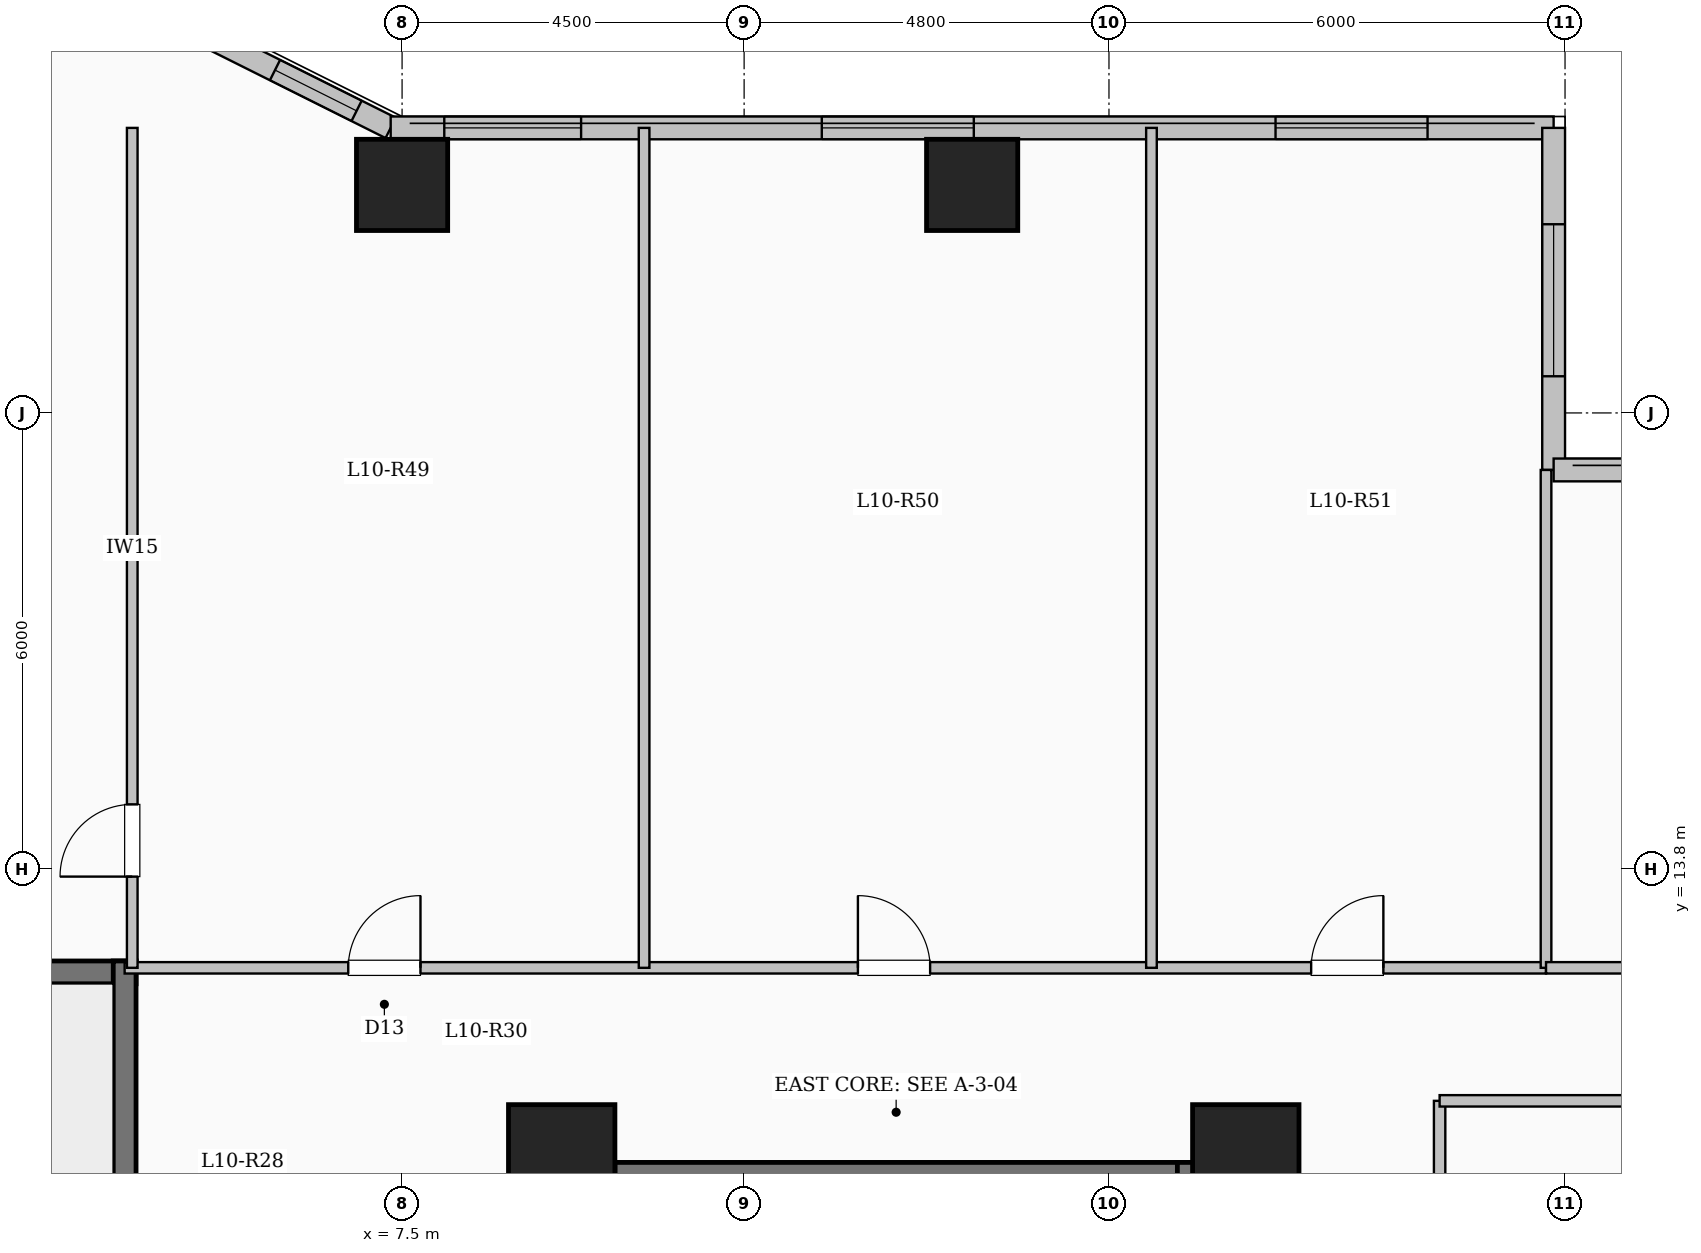
"""IFC4 building model, lengths in metres.
Left out: names, types, materials, properties, quantities, classifications, styles, units other than length and angle.
Written with IfcOpenShell. Run it as: python <this file> out.ifc"""

import sys

from ifc_helpers import new_model, si_unit, direction, frame, frame_2d, origin, origin_2d, place, context, subcontext, project, spatial, rectangle, extrude, element, fill, save


model = new_model("IFC4")
c1 = context("Model", 3, precision=1e-05, world=origin(), true_north=direction((0.0, 1.0)))
c2 = subcontext(c1, "Body", "Model", "MODEL_VIEW")
j1 = project(units=[si_unit("LENGTHUNIT", "METRE"), si_unit("PLANEANGLEUNIT", "RADIAN")], contexts=[c1])
p1 = place(None, origin())
s1 = spatial("IfcSite", under=j1, at=p1, CompositionType="ELEMENT")
p2 = place(p1, origin())
s2 = spatial("IfcBuilding", under=s1, at=p2, CompositionType="ELEMENT")
p3 = place(p2, frame((0.0, 0.0, 40.75)))
s3 = spatial("IfcBuildingStorey", under=s2, at=p3, CompositionType="ELEMENT", Elevation=40.75)
for number, where, z_axis, x_axis in (
    (1, (9.6, 10.0, 0.0), (0.0, 0.0, 1.0), (1.0, 0.0, 0.0)),
    (2, (18.6, 10.0, 0.0), (0.0, 0.0, 1.0), (1.0, 0.0, 0.0)),
):
    element("IfcColumn", number, at=place(p3, frame(where, z_axis=z_axis, x_axis=x_axis)), inside=s3, PredefinedType="COLUMN", context=c2, shape_type="SweptSolid", body=[
        extrude(rectangle(XDim=1.4, YDim=1.4, at=origin_2d()), origin(), (0.0, 0.0, 1.0), 3.35),
    ])
for number, where, z_axis, x_axis in (
    (3, (7.5, 22.8, 0.0), (0.0, 0.0, 1.0), (1.0, 0.0, 0.0)),
    (4, (15.0, 22.8, 0.0), (0.0, 0.0, 1.0), (1.0, 0.0, 0.0)),
):
    element("IfcColumn", number, at=place(p3, frame(where, z_axis=z_axis, x_axis=x_axis)), inside=s3, PredefinedType="COLUMN", context=c2, shape_type="SweptSolid", body=[
        extrude(rectangle(XDim=1.2, YDim=1.2, at=origin_2d()), origin(), (0.0, 0.0, 1.0), 3.35),
    ])
p4 = place(p3, frame((4.35, 25.05, 0.0), z_axis=(0.0, 0.0, 1.0), x_axis=(0.894427191, -0.4472135955, 0.0)))
e5 = element("IfcWall", 5, at=p4, inside=s3, PredefinedType="SOLIDWALL", context=c2, shape_type="SweptSolid", body=[
    extrude(rectangle(XDim=3.354, YDim=0.3, at=frame_2d((1.677, 0.0))), origin(), (0.0, 0.0, 1.0), 3.1),
])
p5 = place(p4, frame((1.653, 0.0, 0.95)))
e6 = element("IfcOpeningElement", 6, at=p5, cuts=e5, PredefinedType="OPENING", context=c2, shape_type="SweptSolid", body=[
    extrude(rectangle(XDim=1.2, YDim=1.5, at=frame_2d((0.6, 0.75))), frame((0.0, 0.16, 0.0), z_axis=(0.0, -1.0, 0.0), x_axis=(1.0, 0.0, 0.0)), (0.0, 0.0, 1.0), 0.32),
])
p6 = place(p3, frame((7.35, 23.55, 0.0), z_axis=(0.0, 0.0, 1.0), x_axis=(1.0, 0.0, 0.0)))
e7 = element("IfcWall", 7, at=p6, inside=s3, PredefinedType="SOLIDWALL", context=c2, shape_type="SweptSolid", body=[
    extrude(rectangle(XDim=15.3, YDim=0.3, at=frame_2d((7.65, 0.0))), origin(), (0.0, 0.0, 1.0), 3.1),
])
p7 = place(p6, frame((0.705, 0.0, 0.9)))
e8 = element("IfcOpeningElement", 8, at=p7, cuts=e7, PredefinedType="OPENING", context=c2, shape_type="SweptSolid", body=[
    extrude(rectangle(XDim=1.8, YDim=1.65, at=frame_2d((0.9, 0.825))), frame((0.0, 0.16, 0.0), z_axis=(0.0, -1.0, 0.0), x_axis=(1.0, 0.0, 0.0)), (0.0, 0.0, 1.0), 0.32),
])
p8 = place(p6, frame((5.672, 0.0, 0.9)))
e9 = element("IfcOpeningElement", 9, at=p8, cuts=e7, PredefinedType="OPENING", context=c2, shape_type="SweptSolid", body=[
    extrude(rectangle(XDim=2.0, YDim=1.7, at=frame_2d((1.0, 0.85))), frame((0.0, 0.16, 0.0), z_axis=(0.0, -1.0, 0.0), x_axis=(1.0, 0.0, 0.0)), (0.0, 0.0, 1.0), 0.32),
])
p9 = place(p6, frame((11.641, 0.0, 0.9)))
e10 = element("IfcOpeningElement", 10, at=p9, cuts=e7, PredefinedType="OPENING", context=c2, shape_type="SweptSolid", body=[
    extrude(rectangle(XDim=2.0, YDim=1.7, at=frame_2d((1.0, 0.85))), frame((0.0, 0.16, 0.0), z_axis=(0.0, -1.0, 0.0), x_axis=(1.0, 0.0, 0.0)), (0.0, 0.0, 1.0), 0.32),
])
p10 = place(p3, frame((22.65, 23.55, 0.0), z_axis=(0.0, 0.0, 1.0), x_axis=(0.0, -1.0, 0.0)))
e11 = element("IfcWall", 11, at=p10, inside=s3, PredefinedType="SOLIDWALL", context=c2, shape_type="SweptSolid", body=[
    extrude(rectangle(XDim=4.5, YDim=0.3, at=frame_2d((2.25, 0.0))), origin(), (0.0, 0.0, 1.0), 3.1),
])
p11 = place(p10, frame((1.268, 0.0, 0.9)))
e12 = element("IfcOpeningElement", 12, at=p11, cuts=e11, PredefinedType="OPENING", context=c2, shape_type="SweptSolid", body=[
    extrude(rectangle(XDim=2.0, YDim=1.7, at=frame_2d((1.0, 0.85))), frame((0.0, 0.16, 0.0), z_axis=(0.0, -1.0, 0.0), x_axis=(1.0, 0.0, 0.0)), (0.0, 0.0, 1.0), 0.32),
])
p12 = place(p3, frame((22.65, 19.05, 0.0), z_axis=(0.0, 0.0, 1.0), x_axis=(1.0, 0.0, 0.0)))
e13 = element("IfcWall", 13, at=p12, inside=s3, PredefinedType="SOLIDWALL", context=c2, shape_type="SweptSolid", body=[
    extrude(rectangle(XDim=6.0, YDim=0.3, at=frame_2d((3.0, 0.0))), origin(), (0.0, 0.0, 1.0), 3.1),
])
p13 = place(p12, frame((1.975, 0.0, 0.9)))
e14 = element("IfcOpeningElement", 14, at=p13, cuts=e13, PredefinedType="OPENING", context=c2, shape_type="SweptSolid", body=[
    extrude(rectangle(XDim=2.0, YDim=1.7, at=frame_2d((1.0, 0.85))), frame((0.0, 0.16, 0.0), z_axis=(0.0, -1.0, 0.0), x_axis=(1.0, 0.0, 0.0)), (0.0, 0.0, 1.0), 0.32),
])
p14 = place(p3, frame((10.0, 9.79, 0.0), z_axis=(0.0, 0.0, 1.0), x_axis=(1.0, 0.0, 0.0)))
e15 = element("IfcWall", 15, at=p14, inside=s3, PredefinedType="SHEAR", context=c2, shape_type="SweptSolid", body=[
    extrude(rectangle(XDim=8.0, YDim=0.3, at=frame_2d((4.0, 0.0))), origin(), (0.0, 0.0, 1.0), 3.35),
])
for number, where, z_axis, x_axis in (
    (16, (10.15, 6.35, 0.0), (0.0, 0.0, 1.0), (0.0, 1.0, 0.0)),
    (17, (17.85, 6.35, 0.0), (0.0, 0.0, 1.0), (0.0, 1.0, 0.0)),
):
    element("IfcWall", number, at=place(p3, frame(where, z_axis=z_axis, x_axis=x_axis)), inside=s3, PredefinedType="SHEAR", context=c2, shape_type="SweptSolid", body=[
        extrude(rectangle(XDim=3.59, YDim=0.3, at=frame_2d((1.795, 0.0))), origin(), (0.0, 0.0, 1.0), 3.35),
    ])
p15 = place(p3, frame((-4.0, 12.44, 0.0), z_axis=(0.0, 0.0, 1.0), x_axis=(1.0, 0.0, 0.0)))
e18 = element("IfcWall", 18, at=p15, inside=s3, PredefinedType="SHEAR", context=c2, shape_type="SweptSolid", body=[
    extrude(rectangle(XDim=8.0, YDim=0.3, at=frame_2d((4.0, 0.0))), origin(), (0.0, 0.0, 1.0), 3.35),
])
p16 = place(p3, frame((3.85, 9.0, 0.0), z_axis=(0.0, 0.0, 1.0), x_axis=(0.0, 1.0, 0.0)))
e19 = element("IfcWall", 19, at=p16, inside=s3, PredefinedType="SHEAR", context=c2, shape_type="SweptSolid", body=[
    extrude(rectangle(XDim=3.59, YDim=0.3, at=frame_2d((1.795, 0.0))), origin(), (0.0, 0.0, 1.0), 3.35),
])
p17 = place(p3, frame((3.85, 12.5, 0.0), z_axis=(0.0, 0.0, 1.0), x_axis=(1.0, 0.0, 0.0)))
e20 = element("IfcWall", 20, at=p17, inside=s3, PredefinedType="PARTITIONING", context=c2, shape_type="SweptSolid", body=[
    extrude(rectangle(XDim=18.7, YDim=0.15, at=frame_2d((9.35, 0.0))), origin(), (0.0, 0.0, 1.0), 3.1),
])
p18 = place(p17, frame((2.942, 0.0, 0.0)))
e21 = element("IfcOpeningElement", 21, at=p18, cuts=e20, PredefinedType="OPENING", context=c2, shape_type="SweptSolid", body=[
    extrude(rectangle(XDim=0.95, YDim=2.15, at=frame_2d((0.475, 1.075))), frame((0.0, 0.085, 0.0), z_axis=(0.0, -1.0, 0.0), x_axis=(1.0, 0.0, 0.0)), (0.0, 0.0, 1.0), 0.17),
])
p19 = place(p17, frame((9.647, 0.0, 0.0)))
e22 = element("IfcOpeningElement", 22, at=p19, cuts=e20, PredefinedType="OPENING", context=c2, shape_type="SweptSolid", body=[
    extrude(rectangle(XDim=0.95, YDim=2.15, at=frame_2d((0.475, 1.075))), frame((0.0, 0.085, 0.0), z_axis=(0.0, -1.0, 0.0), x_axis=(1.0, 0.0, 0.0)), (0.0, 0.0, 1.0), 0.17),
])
p20 = place(p17, frame((15.61, 0.0, 0.0)))
e23 = element("IfcOpeningElement", 23, at=p20, cuts=e20, PredefinedType="OPENING", context=c2, shape_type="SweptSolid", body=[
    extrude(rectangle(XDim=0.95, YDim=2.15, at=frame_2d((0.475, 1.075))), frame((0.0, 0.085, 0.0), z_axis=(0.0, -1.0, 0.0), x_axis=(1.0, 0.0, 0.0)), (0.0, 0.0, 1.0), 0.17),
])
p21 = place(p3, frame((21.15, -7.25, 0.0), z_axis=(0.0, 0.0, 1.0), x_axis=(0.0, 1.0, 0.0)))
e24 = element("IfcWall", 24, at=p21, inside=s3, PredefinedType="PARTITIONING", context=c2, shape_type="SweptSolid", body=[
    extrude(rectangle(XDim=18.0, YDim=0.15, at=frame_2d((9.0, 0.0))), origin(), (0.0, 0.0, 1.0), 2.585),
])
p22 = place(p3, frame((3.95, 12.5, 0.0), z_axis=(0.0, 0.0, 1.0), x_axis=(0.0, 1.0, 0.0)))
e25 = element("IfcWall", 25, at=p22, inside=s3, PredefinedType="PARTITIONING", context=c2, shape_type="SweptSolid", body=[
    extrude(rectangle(XDim=11.05, YDim=0.14, at=frame_2d((5.525, 0.0))), origin(), (0.0, 0.0, 1.0), 3.1),
])
p23 = place(p22, frame((1.2, 0.0, 0.0)))
e26 = element("IfcOpeningElement", 26, at=p23, cuts=e25, PredefinedType="OPENING", context=c2, shape_type="SweptSolid", body=[
    extrude(rectangle(XDim=0.95, YDim=2.15, at=frame_2d((0.475, 1.075))), frame((0.0, 0.08, 0.0), z_axis=(0.0, -1.0, 0.0), x_axis=(1.0, 0.0, 0.0)), (0.0, 0.0, 1.0), 0.16),
])
for number, where, z_axis, x_axis in (
    (27, (10.684, 12.5, 0.0), (0.0, 0.0, 1.0), (0.0, 1.0, 0.0)),
    (28, (17.359, 12.5, 0.0), (0.0, 0.0, 1.0), (0.0, 1.0, 0.0)),
):
    element("IfcWall", number, at=place(p3, frame(where, z_axis=z_axis, x_axis=x_axis)), inside=s3, PredefinedType="PARTITIONING", context=c2, shape_type="SweptSolid", body=[
        extrude(rectangle(XDim=11.05, YDim=0.14, at=frame_2d((5.525, 0.0))), origin(), (0.0, 0.0, 1.0), 3.1),
    ])
p24 = place(p3, frame((21.15, 10.75, 0.0), z_axis=(0.0, 0.0, 1.0), x_axis=(1.0, 0.0, 0.0)))
e29 = element("IfcWall", 29, at=p24, inside=s3, PredefinedType="PARTITIONING", context=c2, shape_type="SweptSolid", body=[
    extrude(rectangle(XDim=7.53, YDim=0.15, at=frame_2d((3.765, 0.0))), origin(), (0.0, 0.0, 1.0), 3.1),
])
p25 = place(p3, frame((22.55, 12.5, 0.0), z_axis=(0.0, 0.0, 1.0), x_axis=(0.0, 1.0, 0.0)))
e30 = element("IfcWall", 30, at=p25, inside=s3, PredefinedType="PARTITIONING", context=c2, shape_type="SweptSolid", body=[
    extrude(rectangle(XDim=6.55, YDim=0.14, at=frame_2d((3.275, 0.0))), origin(), (0.0, 0.0, 1.0), 3.1),
])
p26 = place(p3, frame((22.55, 12.5, 0.0), z_axis=(0.0, 0.0, 1.0), x_axis=(1.0, 0.0, 0.0)))
e31 = element("IfcWall", 31, at=p26, inside=s3, PredefinedType="PARTITIONING", context=c2, shape_type="SweptSolid", body=[
    extrude(rectangle(XDim=6.13, YDim=0.15, at=frame_2d((3.065, 0.0))), origin(), (0.0, 0.0, 1.0), 3.1),
])
p27 = place(p26, frame((2.59, 0.0, 0.0)))
e32 = element("IfcOpeningElement", 32, at=p27, cuts=e31, PredefinedType="OPENING", context=c2, shape_type="SweptSolid", body=[
    extrude(rectangle(XDim=0.95, YDim=2.15, at=frame_2d((0.475, 1.075))), frame((0.0, 0.085, 0.0), z_axis=(0.0, -1.0, 0.0), x_axis=(1.0, 0.0, 0.0)), (0.0, 0.0, 1.0), 0.17),
])
p28 = place(p5, origin())
e33 = element("IfcWindow", 33, at=p28, inside=s3, PartitioningType="SINGLE_PANEL", PredefinedType="WINDOW", context=c2, shape_type="SweptSolid", body=[
    extrude(rectangle(XDim=1.2, YDim=1.5, at=frame_2d((0.6, 0.75))), frame((0.0, 0.03, 0.0), z_axis=(0.0, -1.0, 0.0), x_axis=(1.0, 0.0, 0.0)), (0.0, 0.0, 1.0), 0.06),
])
fill(e6, e33)
p29 = place(p7, origin())
e34 = element("IfcWindow", 34, at=p29, inside=s3, PartitioningType="SINGLE_PANEL", PredefinedType="WINDOW", context=c2, shape_type="SweptSolid", body=[
    extrude(rectangle(XDim=1.8, YDim=1.65, at=frame_2d((0.9, 0.825))), frame((0.0, 0.03, 0.0), z_axis=(0.0, -1.0, 0.0), x_axis=(1.0, 0.0, 0.0)), (0.0, 0.0, 1.0), 0.06),
])
fill(e8, e34)
p30 = place(p8, origin())
e35 = element("IfcWindow", 35, at=p30, inside=s3, PartitioningType="SINGLE_PANEL", PredefinedType="WINDOW", context=c2, shape_type="SweptSolid", body=[
    extrude(rectangle(XDim=2.0, YDim=1.7, at=frame_2d((1.0, 0.85))), frame((0.0, 0.03, 0.0), z_axis=(0.0, -1.0, 0.0), x_axis=(1.0, 0.0, 0.0)), (0.0, 0.0, 1.0), 0.06),
])
fill(e9, e35)
p31 = place(p9, origin())
e36 = element("IfcWindow", 36, at=p31, inside=s3, PartitioningType="SINGLE_PANEL", PredefinedType="WINDOW", context=c2, shape_type="SweptSolid", body=[
    extrude(rectangle(XDim=2.0, YDim=1.7, at=frame_2d((1.0, 0.85))), frame((0.0, 0.03, 0.0), z_axis=(0.0, -1.0, 0.0), x_axis=(1.0, 0.0, 0.0)), (0.0, 0.0, 1.0), 0.06),
])
fill(e10, e36)
p32 = place(p11, origin())
e37 = element("IfcWindow", 37, at=p32, inside=s3, PartitioningType="SINGLE_PANEL", PredefinedType="WINDOW", context=c2, shape_type="SweptSolid", body=[
    extrude(rectangle(XDim=2.0, YDim=1.7, at=frame_2d((1.0, 0.85))), frame((0.0, 0.03, 0.0), z_axis=(0.0, -1.0, 0.0), x_axis=(1.0, 0.0, 0.0)), (0.0, 0.0, 1.0), 0.06),
])
fill(e12, e37)
p33 = place(p18, origin())
e38 = element("IfcDoor", 38, at=p33, inside=s3, OperationType="SINGLE_SWING_RIGHT", PredefinedType="DOOR", context=c2, shape_type="SweptSolid", body=[
    extrude(rectangle(XDim=0.95, YDim=2.15, at=frame_2d((0.475, 1.075))), frame((0.0, 0.025, 0.0), z_axis=(0.0, -1.0, 0.0), x_axis=(1.0, 0.0, 0.0)), (0.0, 0.0, 1.0), 0.05),
])
fill(e21, e38)
p34 = place(p19, origin())
e39 = element("IfcDoor", 39, at=p34, inside=s3, OperationType="SINGLE_SWING_LEFT", PredefinedType="DOOR", context=c2, shape_type="SweptSolid", body=[
    extrude(rectangle(XDim=0.95, YDim=2.15, at=frame_2d((0.475, 1.075))), frame((0.0, 0.025, 0.0), z_axis=(0.0, -1.0, 0.0), x_axis=(1.0, 0.0, 0.0)), (0.0, 0.0, 1.0), 0.05),
])
fill(e22, e39)
p35 = place(p20, origin())
e40 = element("IfcDoor", 40, at=p35, inside=s3, OperationType="SINGLE_SWING_RIGHT", PredefinedType="DOOR", context=c2, shape_type="SweptSolid", body=[
    extrude(rectangle(XDim=0.95, YDim=2.15, at=frame_2d((0.475, 1.075))), frame((0.0, 0.025, 0.0), z_axis=(0.0, -1.0, 0.0), x_axis=(1.0, 0.0, 0.0)), (0.0, 0.0, 1.0), 0.05),
])
fill(e23, e40)
p36 = place(p23, origin())
e41 = element("IfcDoor", 41, at=p36, inside=s3, OperationType="SINGLE_SWING_LEFT", PredefinedType="DOOR", context=c2, shape_type="SweptSolid", body=[
    extrude(rectangle(XDim=0.95, YDim=2.15, at=frame_2d((0.475, 1.075))), frame((0.0, 0.025, 0.0), z_axis=(0.0, -1.0, 0.0), x_axis=(1.0, 0.0, 0.0)), (0.0, 0.0, 1.0), 0.05),
])
fill(e26, e41)
save(model, sys.argv[1])
